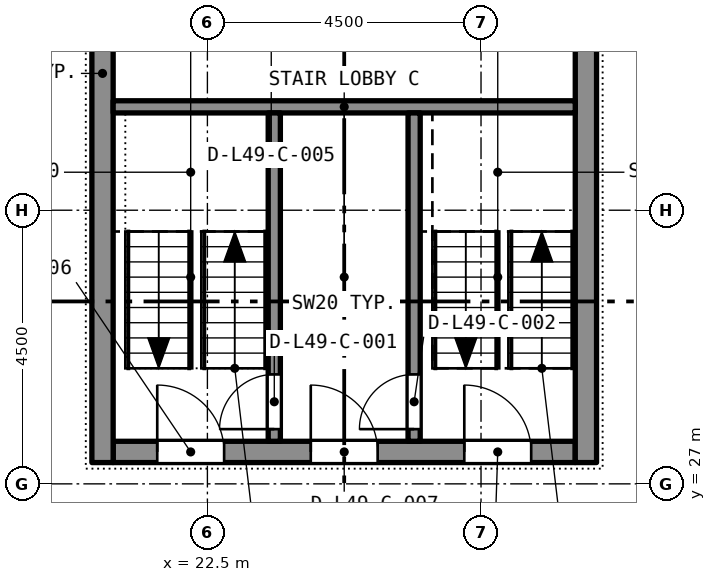
"""IFC4 building model, lengths in metres.
Left out: names, types, materials, properties, quantities, classifications, styles, units other than length and angle.
Written with IfcOpenShell. Run it as: python <this file> out.ifc"""

import sys

from ifc_helpers import new_model, si_unit, direction, frame, frame_2d, origin, place, context, subcontext, project, spatial, rectangle, extrude, element, fill, save


model = new_model("IFC4")
c1 = context("Model", 3, precision=1e-05, world=origin(), true_north=direction((0.0, 1.0)))
c2 = subcontext(c1, "Body", "Model", "MODEL_VIEW")
j1 = project(units=[si_unit("LENGTHUNIT", "METRE"), si_unit("PLANEANGLEUNIT", "RADIAN")], contexts=[c1])
p1 = place(None, origin())
s1 = spatial("IfcSite", under=j1, at=p1, CompositionType="ELEMENT")
p2 = place(p1, origin())
s2 = spatial("IfcBuilding", under=s1, at=p2, CompositionType="ELEMENT")
p3 = place(p2, frame((0.0, 0.0, 179.5)))
s3 = spatial("IfcBuildingStorey", under=s2, at=p3, CompositionType="ELEMENT", Elevation=179.5)
p4 = place(p3, frame((20.95, 27.525, 0.0), z_axis=(0.0, 0.0, 1.0), x_axis=(1.0, 0.0, 0.0)))
e1 = element("IfcWall", 1, at=p4, inside=s3, PredefinedType="SOLIDWALL", context=c2, shape_type="SweptSolid", body=[
    extrude(rectangle(XDim=7.6, YDim=0.35, at=frame_2d((3.8, 0.0))), origin(), (0.0, 0.0, 1.0), 3.2),
])
p5 = place(p4, frame((0.725, 0.0, 0.0)))
e2 = element("IfcOpeningElement", 2, at=p5, cuts=e1, PredefinedType="OPENING", context=c2, shape_type="SweptSolid", body=[
    extrude(rectangle(XDim=1.1, YDim=2.1, at=frame_2d((0.55, 1.05))), frame((0.0, 0.185, 0.0), z_axis=(0.0, -1.0, 0.0), x_axis=(1.0, 0.0, 0.0)), (0.0, 0.0, 1.0), 0.37),
])
p6 = place(p4, frame((3.25, 0.0, 0.0)))
e3 = element("IfcOpeningElement", 3, at=p6, cuts=e1, PredefinedType="OPENING", context=c2, shape_type="SweptSolid", body=[
    extrude(rectangle(XDim=1.1, YDim=2.1, at=frame_2d((0.55, 1.05))), frame((0.0, 0.185, 0.0), z_axis=(0.0, -1.0, 0.0), x_axis=(1.0, 0.0, 0.0)), (0.0, 0.0, 1.0), 0.37),
])
p7 = place(p4, frame((5.775, 0.0, 0.0)))
e4 = element("IfcOpeningElement", 4, at=p7, cuts=e1, PredefinedType="OPENING", context=c2, shape_type="SweptSolid", body=[
    extrude(rectangle(XDim=1.1, YDim=2.1, at=frame_2d((0.55, 1.05))), frame((0.0, 0.185, 0.0), z_axis=(0.0, -1.0, 0.0), x_axis=(1.0, 0.0, 0.0)), (0.0, 0.0, 1.0), 0.37),
])
p8 = place(p3, frame((20.775, 27.35, 0.0), z_axis=(0.0, 0.0, 1.0), x_axis=(0.0, 1.0, 0.0)))
e5 = element("IfcWall", 5, at=p8, inside=s3, PredefinedType="SOLIDWALL", context=c2, shape_type="SweptSolid", body=[
    extrude(rectangle(XDim=12.8, YDim=0.35, at=frame_2d((6.4, 0.0))), origin(), (0.0, 0.0, 1.0), 3.2),
])
p9 = place(p8, frame((8.6, 0.0, 0.0)))
e6 = element("IfcOpeningElement", 6, at=p9, cuts=e5, PredefinedType="OPENING", context=c2, shape_type="SweptSolid", body=[
    extrude(rectangle(XDim=1.2, YDim=2.1, at=frame_2d((0.6, 1.05))), frame((0.0, 0.185, 0.0), z_axis=(0.0, -1.0, 0.0), x_axis=(1.0, 0.0, 0.0)), (0.0, 0.0, 1.0), 0.37),
])
p10 = place(p3, frame((28.725, 27.35, 0.0), z_axis=(0.0, 0.0, 1.0), x_axis=(0.0, 1.0, 0.0)))
e7 = element("IfcWall", 7, at=p10, inside=s3, PredefinedType="SOLIDWALL", context=c2, shape_type="SweptSolid", body=[
    extrude(rectangle(XDim=12.8, YDim=0.35, at=frame_2d((6.4, 0.0))), origin(), (0.0, 0.0, 1.0), 3.2),
])
p11 = place(p10, frame((8.6, 0.0, 0.0)))
e8 = element("IfcOpeningElement", 8, at=p11, cuts=e7, PredefinedType="OPENING", context=c2, shape_type="SweptSolid", body=[
    extrude(rectangle(XDim=1.2, YDim=2.1, at=frame_2d((0.6, 1.05))), frame((0.0, 0.185, 0.0), z_axis=(0.0, -1.0, 0.0), x_axis=(1.0, 0.0, 0.0)), (0.0, 0.0, 1.0), 0.37),
])
p12 = place(p3, frame((20.95, 33.2, 0.0), z_axis=(0.0, 0.0, 1.0), x_axis=(1.0, 0.0, 0.0)))
e9 = element("IfcWall", 9, at=p12, inside=s3, PredefinedType="SOLIDWALL", context=c2, shape_type="SweptSolid", body=[
    extrude(rectangle(XDim=7.6, YDim=0.2, at=frame_2d((3.8, 0.0))), origin(), (0.0, 0.0, 1.0), 2.9),
])
p13 = place(p3, frame((23.6, 27.7, 0.0), z_axis=(0.0, 0.0, 1.0), x_axis=(0.0, 1.0, 0.0)))
e10 = element("IfcWall", 10, at=p13, inside=s3, PredefinedType="SOLIDWALL", context=c2, shape_type="SweptSolid", body=[
    extrude(rectangle(XDim=5.4, YDim=0.2, at=frame_2d((2.7, 0.0))), origin(), (0.0, 0.0, 1.0), 2.9),
])
p14 = place(p13, frame((0.2, 0.0, 0.0)))
e11 = element("IfcOpeningElement", 11, at=p14, cuts=e10, PredefinedType="OPENING", context=c2, shape_type="SweptSolid", body=[
    extrude(rectangle(XDim=0.9, YDim=2.1, at=frame_2d((0.45, 1.05))), frame((0.0, 0.11, 0.0), z_axis=(0.0, -1.0, 0.0), x_axis=(1.0, 0.0, 0.0)), (0.0, 0.0, 1.0), 0.22),
])
p15 = place(p3, frame((25.9, 27.7, 0.0), z_axis=(0.0, 0.0, 1.0), x_axis=(0.0, 1.0, 0.0)))
e12 = element("IfcWall", 12, at=p15, inside=s3, PredefinedType="SOLIDWALL", context=c2, shape_type="SweptSolid", body=[
    extrude(rectangle(XDim=5.4, YDim=0.2, at=frame_2d((2.7, 0.0))), origin(), (0.0, 0.0, 1.0), 2.9),
])
p16 = place(p15, frame((0.2, 0.0, 0.0)))
e13 = element("IfcOpeningElement", 13, at=p16, cuts=e12, PredefinedType="OPENING", context=c2, shape_type="SweptSolid", body=[
    extrude(rectangle(XDim=0.9, YDim=2.1, at=frame_2d((0.45, 1.05))), frame((0.0, 0.11, 0.0), z_axis=(0.0, -1.0, 0.0), x_axis=(1.0, 0.0, 0.0)), (0.0, 0.0, 1.0), 0.22),
])
p17 = place(p14, origin())
e14 = element("IfcDoor", 14, at=p17, inside=s3, OperationType="SINGLE_SWING_LEFT", PredefinedType="DOOR", context=c2, shape_type="SweptSolid", body=[
    extrude(rectangle(XDim=0.9, YDim=2.1, at=frame_2d((0.45, 1.05))), frame((0.0, 0.025, 0.0), z_axis=(0.0, -1.0, 0.0), x_axis=(1.0, 0.0, 0.0)), (0.0, 0.0, 1.0), 0.05),
])
fill(e11, e14)
p18 = place(p16, origin())
e15 = element("IfcDoor", 15, at=p18, inside=s3, OperationType="SINGLE_SWING_LEFT", PredefinedType="DOOR", context=c2, shape_type="SweptSolid", body=[
    extrude(rectangle(XDim=0.9, YDim=2.1, at=frame_2d((0.45, 1.05))), frame((0.0, 0.025, 0.0), z_axis=(0.0, -1.0, 0.0), x_axis=(1.0, 0.0, 0.0)), (0.0, 0.0, 1.0), 0.05),
])
fill(e13, e15)
p19 = place(p5, origin())
e16 = element("IfcDoor", 16, at=p19, inside=s3, OperationType="SINGLE_SWING_LEFT", PredefinedType="DOOR", context=c2, shape_type="SweptSolid", body=[
    extrude(rectangle(XDim=1.1, YDim=2.1, at=frame_2d((0.55, 1.05))), frame((0.0, 0.025, 0.0), z_axis=(0.0, -1.0, 0.0), x_axis=(1.0, 0.0, 0.0)), (0.0, 0.0, 1.0), 0.05),
])
fill(e2, e16)
p20 = place(p6, origin())
e17 = element("IfcDoor", 17, at=p20, inside=s3, OperationType="SINGLE_SWING_LEFT", PredefinedType="DOOR", context=c2, shape_type="SweptSolid", body=[
    extrude(rectangle(XDim=1.1, YDim=2.1, at=frame_2d((0.55, 1.05))), frame((0.0, 0.025, 0.0), z_axis=(0.0, -1.0, 0.0), x_axis=(1.0, 0.0, 0.0)), (0.0, 0.0, 1.0), 0.05),
])
fill(e3, e17)
p21 = place(p7, origin())
e18 = element("IfcDoor", 18, at=p21, inside=s3, OperationType="SINGLE_SWING_LEFT", PredefinedType="DOOR", context=c2, shape_type="SweptSolid", body=[
    extrude(rectangle(XDim=1.1, YDim=2.1, at=frame_2d((0.55, 1.05))), frame((0.0, 0.025, 0.0), z_axis=(0.0, -1.0, 0.0), x_axis=(1.0, 0.0, 0.0)), (0.0, 0.0, 1.0), 0.05),
])
fill(e4, e18)
save(model, sys.argv[1])
